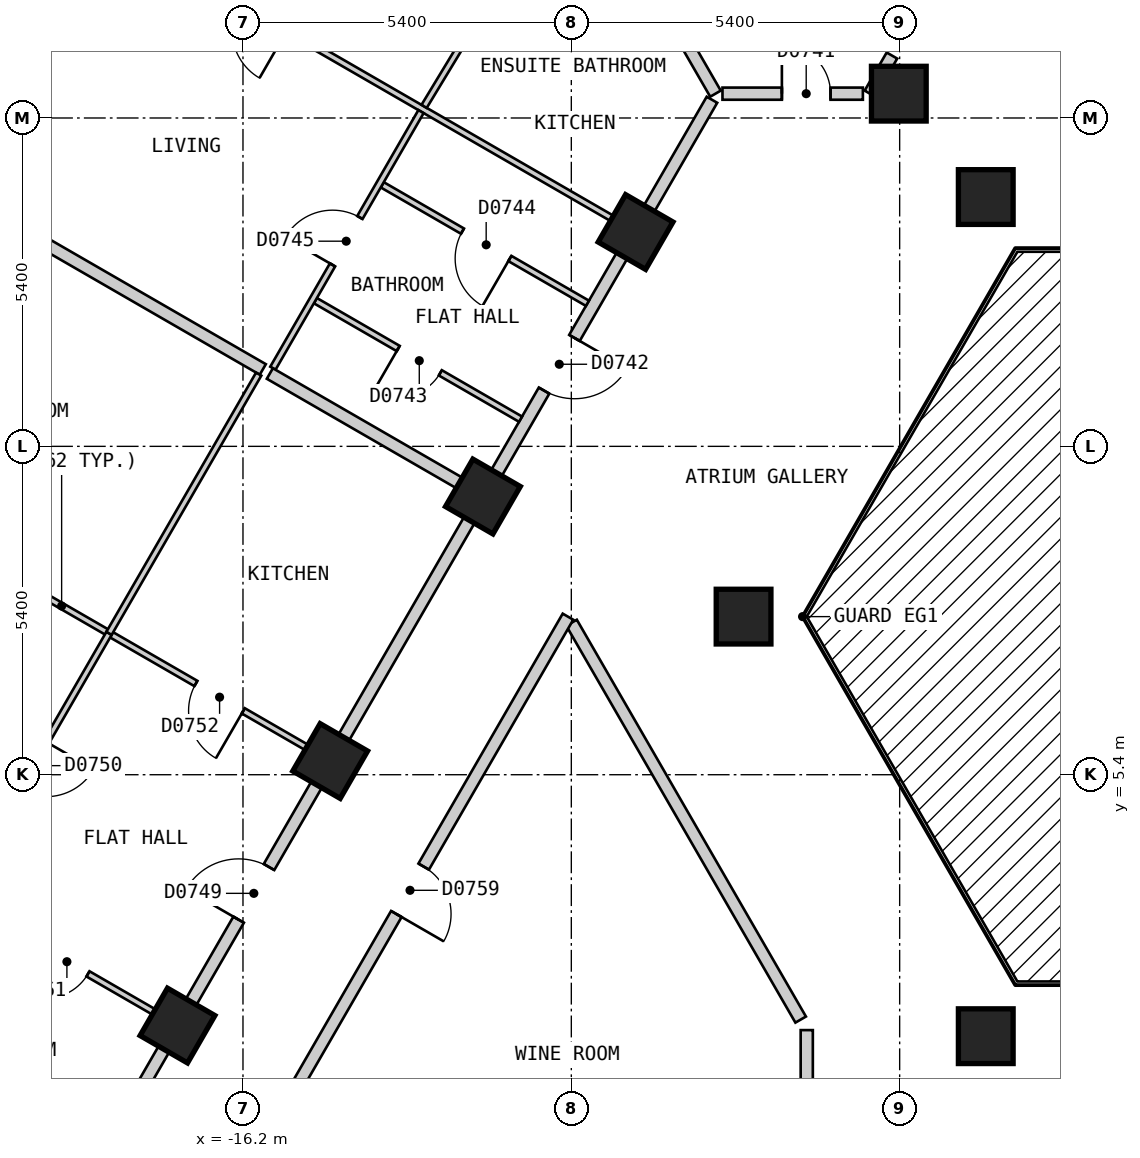
"""IFC4 building model, lengths in metres.
Left out: names, types, materials, properties, quantities, classifications, styles, units other than length and angle.
Written with IfcOpenShell. Run it as: python <this file> out.ifc"""

import sys

from ifc_helpers import new_model, si_unit, direction, frame, frame_2d, origin, origin_2d, place, context, subcontext, project, spatial, polyline, rectangle, outline, extrude, element, fill, save


model = new_model("IFC4")
c1 = context("Model", 3, precision=1e-05, world=origin(), true_north=direction((0.0, 1.0)))
c2 = subcontext(c1, "Body", "Model", "MODEL_VIEW")
j1 = project(units=[si_unit("LENGTHUNIT", "METRE"), si_unit("PLANEANGLEUNIT", "RADIAN")], contexts=[c1])
p1 = place(None, origin())
s1 = spatial("IfcSite", under=j1, at=p1, CompositionType="ELEMENT")
p2 = place(p1, origin())
s2 = spatial("IfcBuilding", under=s1, at=p2, CompositionType="ELEMENT")
p3 = place(p2, frame((0.0, 0.0, 105.0)))
s3 = spatial("IfcBuildingStorey", under=s2, at=p3, CompositionType="ELEMENT", Elevation=105.0)
for number, where, z_axis, x_axis in (
    (1, (-3.984, 14.9, 0.0), (0.0, 0.0, 1.0), (1.0, 0.0, 0.0)),
    (2, (-5.414, 16.6, 0.0), (0.0, 0.0, 1.0), (-1.0, 0.0, 0.0)),
    (3, (-9.743, 14.325, 0.0), (0.0, 0.0, 1.0), (-0.5, -0.866, 0.0)),
    (4, (-7.967, 8.0, 0.0), (0.0, 0.0, 1.0), (1.0, 0.0, 0.0)),
    (5, (-12.254, 9.975, 0.0), (0.0, 0.0, 1.0), (-0.5, -0.866, 0.0)),
    (6, (-14.766, 5.625, 0.0), (0.0, 0.0, 1.0), (-0.5, -0.866, 0.0)),
    (7, (-3.984, 1.1, 0.0), (0.0, 0.0, 1.0), (1.0, 0.0, 0.0)),
    (8, (-17.277, 1.275, 0.0), (0.0, 0.0, 1.0), (-0.5, -0.866, 0.0)),
):
    element("IfcColumn", number, at=place(p3, frame(where, z_axis=z_axis, x_axis=x_axis)), inside=s3, PredefinedType="COLUMN", context=c2, shape_type="SweptSolid", body=[
        extrude(rectangle(XDim=0.9, YDim=0.9, at=origin_2d()), origin(), (0.0, 0.0, 1.0), 3.0),
    ])
p4 = place(p3, frame((-15.747, 24.425, 0.0), z_axis=(0.0, 0.0, 1.0), x_axis=(-0.500027479704, -0.866009537788, 0.0)))
e9 = element("IfcWall", 9, at=p4, inside=s3, PredefinedType="SOLIDWALL", context=c2, shape_type="SweptSolid", body=[
    extrude(outline(polyline([(0.0, -0.15), (26.559, -0.15), (26.478, 0.15), (0.08, 0.15), (0.0, -0.15)])), origin(), (0.0, 0.0, 1.0), 2.6),
])
p5 = place(p4, frame((1.227, 0.0, 0.15)))
e10 = element("IfcOpeningElement", 10, at=p5, cuts=e9, PredefinedType="OPENING", context=c2, shape_type="SweptSolid", body=[
    extrude(rectangle(XDim=1.5, YDim=2.1, at=frame_2d((0.75, 1.05))), frame((0.0, 0.16, 0.0), z_axis=(0.0, -1.0, 0.0), x_axis=(1.0, 0.0, 0.0)), (0.0, 0.0, 1.0), 0.32),
])
p6 = place(p4, frame((3.739, 0.0, 0.15)))
e11 = element("IfcOpeningElement", 11, at=p6, cuts=e9, PredefinedType="OPENING", context=c2, shape_type="SweptSolid", body=[
    extrude(rectangle(XDim=1.5, YDim=2.1, at=frame_2d((0.75, 1.05))), frame((0.0, 0.16, 0.0), z_axis=(0.0, -1.0, 0.0), x_axis=(1.0, 0.0, 0.0)), (0.0, 0.0, 1.0), 0.32),
])
p7 = place(p4, frame((6.25, 0.0, 0.15)))
e12 = element("IfcOpeningElement", 12, at=p7, cuts=e9, PredefinedType="OPENING", context=c2, shape_type="SweptSolid", body=[
    extrude(rectangle(XDim=1.5, YDim=2.1, at=frame_2d((0.75, 1.05))), frame((0.0, 0.16, 0.0), z_axis=(0.0, -1.0, 0.0), x_axis=(1.0, 0.0, 0.0)), (0.0, 0.0, 1.0), 0.32),
])
p8 = place(p4, frame((8.761, 0.0, 0.15)))
e13 = element("IfcOpeningElement", 13, at=p8, cuts=e9, PredefinedType="OPENING", context=c2, shape_type="SweptSolid", body=[
    extrude(rectangle(XDim=1.5, YDim=2.1, at=frame_2d((0.75, 1.05))), frame((0.0, 0.16, 0.0), z_axis=(0.0, -1.0, 0.0), x_axis=(1.0, 0.0, 0.0)), (0.0, 0.0, 1.0), 0.32),
])
p9 = place(p4, frame((11.273, 0.0, 0.15)))
e14 = element("IfcOpeningElement", 14, at=p9, cuts=e9, PredefinedType="OPENING", context=c2, shape_type="SweptSolid", body=[
    extrude(rectangle(XDim=1.5, YDim=2.1, at=frame_2d((0.75, 1.05))), frame((0.0, 0.16, 0.0), z_axis=(0.0, -1.0, 0.0), x_axis=(1.0, 0.0, 0.0)), (0.0, 0.0, 1.0), 0.32),
])
p10 = place(p4, frame((13.785, 0.0, 0.15)))
e15 = element("IfcOpeningElement", 15, at=p10, cuts=e9, PredefinedType="OPENING", context=c2, shape_type="SweptSolid", body=[
    extrude(rectangle(XDim=1.5, YDim=2.1, at=frame_2d((0.75, 1.05))), frame((0.0, 0.16, 0.0), z_axis=(0.0, -1.0, 0.0), x_axis=(1.0, 0.0, 0.0)), (0.0, 0.0, 1.0), 0.32),
])
p11 = place(p4, frame((16.296, 0.0, 0.15)))
e16 = element("IfcOpeningElement", 16, at=p11, cuts=e9, PredefinedType="OPENING", context=c2, shape_type="SweptSolid", body=[
    extrude(rectangle(XDim=1.5, YDim=2.1, at=frame_2d((0.75, 1.05))), frame((0.0, 0.16, 0.0), z_axis=(0.0, -1.0, 0.0), x_axis=(1.0, 0.0, 0.0)), (0.0, 0.0, 1.0), 0.32),
])
p12 = place(p4, frame((18.807, 0.0, 0.15)))
e17 = element("IfcOpeningElement", 17, at=p12, cuts=e9, PredefinedType="OPENING", context=c2, shape_type="SweptSolid", body=[
    extrude(rectangle(XDim=1.5, YDim=2.1, at=frame_2d((0.75, 1.05))), frame((0.0, 0.16, 0.0), z_axis=(0.0, -1.0, 0.0), x_axis=(1.0, 0.0, 0.0)), (0.0, 0.0, 1.0), 0.32),
])
p13 = place(p4, frame((21.319, 0.0, 0.15)))
e18 = element("IfcOpeningElement", 18, at=p13, cuts=e9, PredefinedType="OPENING", context=c2, shape_type="SweptSolid", body=[
    extrude(rectangle(XDim=1.5, YDim=2.1, at=frame_2d((0.75, 1.05))), frame((0.0, 0.16, 0.0), z_axis=(0.0, -1.0, 0.0), x_axis=(1.0, 0.0, 0.0)), (0.0, 0.0, 1.0), 0.32),
])
p14 = place(p4, frame((23.831, 0.0, 0.15)))
e19 = element("IfcOpeningElement", 19, at=p14, cuts=e9, PredefinedType="OPENING", context=c2, shape_type="SweptSolid", body=[
    extrude(rectangle(XDim=1.5, YDim=2.1, at=frame_2d((0.75, 1.05))), frame((0.0, 0.16, 0.0), z_axis=(0.0, -1.0, 0.0), x_axis=(1.0, 0.0, 0.0)), (0.0, 0.0, 1.0), 0.32),
])
p15 = place(p3, frame((-10.796, 7.899, 0.0), z_axis=(0.0, 0.0, 1.0), x_axis=(0.500010383074, -0.866019409031, 0.0)))
e20 = element("IfcWall", 20, at=p15, inside=s3, PredefinedType="PARTITIONING", context=c2, shape_type="SweptSolid", body=[
    extrude(rectangle(XDim=7.535, YDim=0.2, at=frame_2d((3.768, 0.0))), origin(), (0.0, 0.0, 1.0), 2.6),
])
p16 = place(p3, frame((-8.314, 16.6, 0.0), z_axis=(0.0, 0.0, 1.0), x_axis=(1.0, 0.0, 0.0)))
e21 = element("IfcWall", 21, at=p16, inside=s3, PredefinedType="PARTITIONING", context=c2, shape_type="SweptSolid", body=[
    extrude(rectangle(XDim=2.309, YDim=0.2, at=frame_2d((1.155, 0.0))), origin(), (0.0, 0.0, 1.0), 2.6),
])
p17 = place(p16, frame((0.977, 0.0, 0.0)))
e22 = element("IfcOpeningElement", 22, at=p17, cuts=e21, PredefinedType="OPENING", context=c2, shape_type="SweptSolid", body=[
    extrude(rectangle(XDim=0.8, YDim=2.1, at=frame_2d((0.4, 1.05))), frame((0.0, 0.11, 0.0), z_axis=(0.0, -1.0, 0.0), x_axis=(1.0, 0.0, 0.0)), (0.0, 0.0, 1.0), 0.22),
])
p18 = place(p3, frame((-16.05, -1.0, 0.0), z_axis=(0.0, 0.0, 1.0), x_axis=(0.499962449088, 0.866047082728, 0.0)))
e23 = element("IfcWall", 23, at=p18, inside=s3, PredefinedType="PARTITIONING", context=c2, shape_type="SweptSolid", body=[
    extrude(rectangle(XDim=10.391, YDim=0.2, at=frame_2d((5.195, 0.0))), origin(), (0.0, 0.0, 1.0), 2.6),
])
p19 = place(p18, frame((4.745, 0.0, 0.0)))
e24 = element("IfcOpeningElement", 24, at=p19, cuts=e23, PredefinedType="OPENING", context=c2, shape_type="SweptSolid", body=[
    extrude(rectangle(XDim=0.9, YDim=2.1, at=frame_2d((0.45, 1.05))), frame((0.0, 0.11, 0.0), z_axis=(0.0, -1.0, 0.0), x_axis=(1.0, 0.0, 0.0)), (0.0, 0.0, 1.0), 0.22),
])
p20 = place(p3, frame((-5.889, 16.6, 0.0), z_axis=(0.0, 0.0, 1.0), x_axis=(0.499839240638, 0.866118198353, 0.0)))
e25 = element("IfcWall", 25, at=p20, inside=s3, PredefinedType="PARTITIONING", context=c2, shape_type="SweptSolid", body=[
    extrude(rectangle(XDim=0.724, YDim=0.2, at=frame_2d((0.362, 0.0))), origin(), (0.0, 0.0, 1.0), 2.6),
])
p21 = place(p3, frame((-18.533, -0.901, 0.0), z_axis=(0.0, 0.0, 1.0), x_axis=(0.499981198768, 0.866036258409, 0.0)))
e26 = element("IfcWall", 26, at=p21, inside=s3, PredefinedType="PARTITIONING", context=c2, shape_type="SweptSolid", body=[
    extrude(rectangle(XDim=20.093, YDim=0.2, at=frame_2d((10.046, 0.0))), origin(), (0.0, 0.0, 1.0), 2.6),
])
p22 = place(p21, frame((14.57, 0.0, 0.0)))
e27 = element("IfcOpeningElement", 27, at=p22, cuts=e26, PredefinedType="OPENING", context=c2, shape_type="SweptSolid", body=[
    extrude(rectangle(XDim=1.0, YDim=2.1, at=frame_2d((0.5, 1.05))), frame((0.0, 0.11, 0.0), z_axis=(0.0, -1.0, 0.0), x_axis=(1.0, 0.0, 0.0)), (0.0, 0.0, 1.0), 0.22),
])
p23 = place(p21, frame((4.523, 0.0, 0.0)))
e28 = element("IfcOpeningElement", 28, at=p23, cuts=e26, PredefinedType="OPENING", context=c2, shape_type="SweptSolid", body=[
    extrude(rectangle(XDim=1.0, YDim=2.1, at=frame_2d((0.5, 1.05))), frame((0.0, 0.11, 0.0), z_axis=(0.0, -1.0, 0.0), x_axis=(1.0, 0.0, 0.0)), (0.0, 0.0, 1.0), 0.22),
])
p24 = place(p3, frame((-6.928, -2.799, 0.0), z_axis=(0.0, 0.0, 1.0), x_axis=(0.0, 1.0, 0.0)))
e29 = element("IfcWall", 29, at=p24, inside=s3, PredefinedType="PARTITIONING", context=c2, shape_type="SweptSolid", body=[
    extrude(rectangle(XDim=3.999, YDim=0.2, at=frame_2d((2.0, 0.0))), origin(), (0.0, 0.0, 1.0), 2.6),
])
p25 = place(p3, frame((-26.025, 6.325, 0.0), z_axis=(0.0, 0.0, 1.0), x_axis=(0.866041268327, -0.499972520799, 0.0)))
e30 = element("IfcWall", 30, at=p25, inside=s3, PredefinedType="PARTITIONING", context=c2, shape_type="SweptSolid", body=[
    extrude(rectangle(XDim=10.0, YDim=0.1, at=frame_2d((5.0, 0.0))), origin(), (0.0, 0.0, 1.0), 2.6),
])
p26 = place(p25, frame((7.601, 0.0, 0.0)))
e31 = element("IfcOpeningElement", 31, at=p26, cuts=e30, PredefinedType="OPENING", context=c2, shape_type="SweptSolid", body=[
    extrude(rectangle(XDim=0.8, YDim=2.1, at=frame_2d((0.4, 1.05))), frame((0.0, 0.06, 0.0), z_axis=(0.0, -1.0, 0.0), x_axis=(1.0, 0.0, 0.0)), (0.0, 0.0, 1.0), 0.12),
])
p27 = place(p25, frame((2.5, 0.0, 0.0)))
e32 = element("IfcOpeningElement", 32, at=p27, cuts=e30, PredefinedType="OPENING", context=c2, shape_type="SweptSolid", body=[
    extrude(rectangle(XDim=0.9, YDim=2.1, at=frame_2d((0.45, 1.05))), frame((0.0, 0.06, 0.0), z_axis=(0.0, -1.0, 0.0), x_axis=(1.0, 0.0, 0.0)), (0.0, 0.0, 1.0), 0.12),
])
p28 = place(p3, frame((-23.513, 10.675, 0.0), z_axis=(0.0, 0.0, 1.0), x_axis=(0.866041268327, -0.499972520799, 0.0)))
e33 = element("IfcWall", 33, at=p28, inside=s3, PredefinedType="PARTITIONING", context=c2, shape_type="SweptSolid", body=[
    extrude(rectangle(XDim=10.0, YDim=0.1, at=frame_2d((5.0, 0.0))), origin(), (0.0, 0.0, 1.0), 2.6),
])
p29 = place(p28, frame((7.55, 0.0, 0.0)))
e34 = element("IfcOpeningElement", 34, at=p29, cuts=e33, PredefinedType="OPENING", context=c2, shape_type="SweptSolid", body=[
    extrude(rectangle(XDim=0.9, YDim=2.1, at=frame_2d((0.45, 1.05))), frame((0.0, 0.06, 0.0), z_axis=(0.0, -1.0, 0.0), x_axis=(1.0, 0.0, 0.0)), (0.0, 0.0, 1.0), 0.12),
])
p30 = place(p28, frame((2.5, 0.0, 0.0)))
e35 = element("IfcOpeningElement", 35, at=p30, cuts=e33, PredefinedType="OPENING", context=c2, shape_type="SweptSolid", body=[
    extrude(rectangle(XDim=0.9, YDim=2.1, at=frame_2d((0.45, 1.05))), frame((0.0, 0.06, 0.0), z_axis=(0.0, -1.0, 0.0), x_axis=(1.0, 0.0, 0.0)), (0.0, 0.0, 1.0), 0.12),
])
p31 = place(p3, frame((-15.009, 13.196, 0.0), z_axis=(0.0, 0.0, 1.0), x_axis=(0.865916335424, -0.500188864377, 0.0)))
e36 = element("IfcWall", 36, at=p31, inside=s3, PredefinedType="PARTITIONING", context=c2, shape_type="SweptSolid", body=[
    extrude(rectangle(XDim=3.896, YDim=0.1, at=frame_2d((1.948, 0.0))), origin(), (0.0, 0.0, 1.0), 2.6),
])
p32 = place(p31, frame((1.573, 0.0, 0.0)))
e37 = element("IfcOpeningElement", 37, at=p32, cuts=e36, PredefinedType="OPENING", context=c2, shape_type="SweptSolid", body=[
    extrude(rectangle(XDim=0.8, YDim=2.1, at=frame_2d((0.4, 1.05))), frame((0.0, 0.06, 0.0), z_axis=(0.0, -1.0, 0.0), x_axis=(1.0, 0.0, 0.0)), (0.0, 0.0, 1.0), 0.12),
])
p33 = place(p3, frame((-13.909, 15.101, 0.0), z_axis=(0.0, 0.0, 1.0), x_axis=(0.866024880635, -0.500000906121, 0.0)))
e38 = element("IfcWall", 38, at=p33, inside=s3, PredefinedType="PARTITIONING", context=c2, shape_type="SweptSolid", body=[
    extrude(rectangle(XDim=3.896, YDim=0.1, at=frame_2d((1.948, 0.0))), origin(), (0.0, 0.0, 1.0), 2.6),
])
p34 = place(p33, frame((1.523, 0.0, 0.0)))
e39 = element("IfcOpeningElement", 39, at=p34, cuts=e38, PredefinedType="OPENING", context=c2, shape_type="SweptSolid", body=[
    extrude(rectangle(XDim=0.9, YDim=2.1, at=frame_2d((0.45, 1.05))), frame((0.0, 0.06, 0.0), z_axis=(0.0, -1.0, 0.0), x_axis=(1.0, 0.0, 0.0)), (0.0, 0.0, 1.0), 0.12),
])
p35 = place(p3, frame((-18.489, 19.375, 0.0), z_axis=(0.0, 0.0, 1.0), x_axis=(0.866016855193, -0.500014806302, 0.0)))
e40 = element("IfcWall", 40, at=p35, inside=s3, PredefinedType="PARTITIONING", context=c2, shape_type="SweptSolid", body=[
    extrude(rectangle(XDim=10.0, YDim=0.1, at=frame_2d((5.0, 0.0))), origin(), (0.0, 0.0, 1.0), 2.6),
])
p36 = place(p35, frame((2.577, 0.0, 0.0)))
e41 = element("IfcOpeningElement", 41, at=p36, cuts=e40, PredefinedType="OPENING", context=c2, shape_type="SweptSolid", body=[
    extrude(rectangle(XDim=0.9, YDim=2.1, at=frame_2d((0.45, 1.05))), frame((0.0, 0.06, 0.0), z_axis=(0.0, -1.0, 0.0), x_axis=(1.0, 0.0, 0.0)), (0.0, 0.0, 1.0), 0.12),
])
p37 = place(p3, frame((-13.221, 16.391, 0.0), z_axis=(0.0, 0.0, 1.0), x_axis=(0.518164725284, 0.855280841286, 0.0)))
e42 = element("IfcWall", 42, at=p37, inside=s3, PredefinedType="PARTITIONING", context=c2, shape_type="SweptSolid", body=[
    extrude(rectangle(XDim=4.74, YDim=0.1, at=frame_2d((2.37, 0.0))), origin(), (0.0, 0.0, 1.0), 2.6),
])
p38 = place(p37, frame((2.002, 0.0, 0.0)))
e43 = element("IfcOpeningElement", 43, at=p38, cuts=e42, PredefinedType="OPENING", context=c2, shape_type="SweptSolid", body=[
    extrude(rectangle(XDim=0.8, YDim=2.1, at=frame_2d((0.4, 1.05))), frame((0.0, 0.06, 0.0), z_axis=(0.0, -1.0, 0.0), x_axis=(1.0, 0.0, 0.0)), (0.0, 0.0, 1.0), 0.12),
])
p39 = place(p3, frame((-15.708, 12.085, 0.0), z_axis=(0.0, 0.0, 1.0), x_axis=(0.499943653708, 0.866057932887, 0.0)))
e44 = element("IfcWall", 44, at=p39, inside=s3, PredefinedType="PARTITIONING", context=c2, shape_type="SweptSolid", body=[
    extrude(rectangle(XDim=4.873, YDim=0.1, at=frame_2d((2.436, 0.0))), origin(), (0.0, 0.0, 1.0), 2.6),
])
p40 = place(p39, frame((1.962, 0.0, 0.0)))
e45 = element("IfcOpeningElement", 45, at=p40, cuts=e44, PredefinedType="OPENING", context=c2, shape_type="SweptSolid", body=[
    extrude(rectangle(XDim=0.9, YDim=2.1, at=frame_2d((0.45, 1.05))), frame((0.0, 0.06, 0.0), z_axis=(0.0, -1.0, 0.0), x_axis=(1.0, 0.0, 0.0)), (0.0, 0.0, 1.0), 0.12),
])
p41 = place(p3, frame((-20.89, 3.418, 0.0), z_axis=(0.0, 0.0, 1.0), x_axis=(0.500014231302, 0.866017187182, 0.0)))
e46 = element("IfcWall", 46, at=p41, inside=s3, PredefinedType="PARTITIONING", context=c2, shape_type="SweptSolid", body=[
    extrude(rectangle(XDim=4.973, YDim=0.1, at=frame_2d((2.487, 0.0))), origin(), (0.0, 0.0, 1.0), 2.6),
])
p42 = place(p41, frame((2.011, 0.0, 0.0)))
e47 = element("IfcOpeningElement", 47, at=p42, cuts=e46, PredefinedType="OPENING", context=c2, shape_type="SweptSolid", body=[
    extrude(rectangle(XDim=0.9, YDim=2.1, at=frame_2d((0.45, 1.05))), frame((0.0, 0.06, 0.0), z_axis=(0.0, -1.0, 0.0), x_axis=(1.0, 0.0, 0.0)), (0.0, 0.0, 1.0), 0.12),
])
p43 = place(p3, frame((-10.727, 20.58, 0.0), z_axis=(0.0, 0.0, 1.0), x_axis=(0.500041272028, -0.866001574057, 0.0)))
e48 = element("IfcWall", 48, at=p43, inside=s3, PredefinedType="PARTITIONING", context=c2, shape_type="SweptSolid", body=[
    extrude(rectangle(XDim=4.596, YDim=0.2, at=frame_2d((2.298, 0.0))), origin(), (0.0, 0.0, 1.0), 2.6),
])
p44 = place(p3, frame((-21.001, 15.025, 0.0), z_axis=(0.0, 0.0, 1.0), x_axis=(0.866031754707, -0.499988999718, 0.0)))
e49 = element("IfcWall", 49, at=p44, inside=s3, PredefinedType="PARTITIONING", context=c2, shape_type="SweptSolid", body=[
    extrude(rectangle(XDim=5.92, YDim=0.2, at=frame_2d((2.96, 0.0))), origin(), (0.0, 0.0, 1.0), 2.6),
])
p45 = place(p3, frame((-15.758, 11.998, 0.0), z_axis=(0.0, 0.0, 1.0), x_axis=(0.865987741337, -0.5000652276, 0.0)))
e50 = element("IfcWall", 50, at=p45, inside=s3, PredefinedType="PARTITIONING", context=c2, shape_type="SweptSolid", body=[
    extrude(rectangle(XDim=3.946, YDim=0.2, at=frame_2d((1.973, 0.0))), origin(), (0.0, 0.0, 1.0), 2.6),
])
p46 = place(p3, frame((-18.403, 7.725, 0.0), z_axis=(0.0, 0.0, 1.0), x_axis=(0.499995794706, 0.866027831699, 0.0)))
e51 = element("IfcWall", 51, at=p46, inside=s3, PredefinedType="PARTITIONING", context=c2, shape_type="SweptSolid", body=[
    extrude(rectangle(XDim=4.922, YDim=0.1, at=frame_2d((2.461, 0.0))), origin(), (0.0, 0.0, 1.0), 2.6),
])
p47 = place(p17, origin())
e52 = element("IfcDoor", 52, at=p47, inside=s3, OperationType="SINGLE_SWING_LEFT", PredefinedType="DOOR", context=c2, shape_type="SweptSolid", body=[
    extrude(rectangle(XDim=0.8, YDim=2.1, at=frame_2d((0.4, 1.05))), frame((0.0, 0.025, 0.0), z_axis=(0.0, -1.0, 0.0), x_axis=(1.0, 0.0, 0.0)), (0.0, 0.0, 1.0), 0.05),
])
fill(e22, e52)
p48 = place(p22, origin())
e53 = element("IfcDoor", 53, at=p48, inside=s3, OperationType="SINGLE_SWING_RIGHT", PredefinedType="DOOR", context=c2, shape_type="SweptSolid", body=[
    extrude(rectangle(XDim=1.0, YDim=2.1, at=frame_2d((0.5, 1.05))), frame((0.0, 0.025, 0.0), z_axis=(0.0, -1.0, 0.0), x_axis=(1.0, 0.0, 0.0)), (0.0, 0.0, 1.0), 0.05),
])
fill(e27, e53)
p49 = place(p32, origin())
e54 = element("IfcDoor", 54, at=p49, inside=s3, OperationType="SINGLE_SWING_LEFT", PredefinedType="DOOR", context=c2, shape_type="SweptSolid", body=[
    extrude(rectangle(XDim=0.8, YDim=2.1, at=frame_2d((0.4, 1.05))), frame((0.0, 0.025, 0.0), z_axis=(0.0, -1.0, 0.0), x_axis=(1.0, 0.0, 0.0)), (0.0, 0.0, 1.0), 0.05),
])
fill(e37, e54)
p50 = place(p34, origin())
e55 = element("IfcDoor", 55, at=p50, inside=s3, OperationType="SINGLE_SWING_RIGHT", PredefinedType="DOOR", context=c2, shape_type="SweptSolid", body=[
    extrude(rectangle(XDim=0.9, YDim=2.1, at=frame_2d((0.45, 1.05))), frame((0.0, 0.025, 0.0), z_axis=(0.0, -1.0, 0.0), x_axis=(1.0, 0.0, 0.0)), (0.0, 0.0, 1.0), 0.05),
])
fill(e39, e55)
p51 = place(p40, origin())
e56 = element("IfcDoor", 56, at=p51, inside=s3, OperationType="SINGLE_SWING_LEFT", PredefinedType="DOOR", context=c2, shape_type="SweptSolid", body=[
    extrude(rectangle(XDim=0.9, YDim=2.1, at=frame_2d((0.45, 1.05))), frame((0.0, 0.025, 0.0), z_axis=(0.0, -1.0, 0.0), x_axis=(1.0, 0.0, 0.0)), (0.0, 0.0, 1.0), 0.05),
])
fill(e45, e56)
p52 = place(p23, origin())
e57 = element("IfcDoor", 57, at=p52, inside=s3, OperationType="SINGLE_SWING_LEFT", PredefinedType="DOOR", context=c2, shape_type="SweptSolid", body=[
    extrude(rectangle(XDim=1.0, YDim=2.1, at=frame_2d((0.5, 1.05))), frame((0.0, 0.025, 0.0), z_axis=(0.0, -1.0, 0.0), x_axis=(1.0, 0.0, 0.0)), (0.0, 0.0, 1.0), 0.05),
])
fill(e28, e57)
p53 = place(p26, origin())
e58 = element("IfcDoor", 58, at=p53, inside=s3, OperationType="SINGLE_SWING_LEFT", PredefinedType="DOOR", context=c2, shape_type="SweptSolid", body=[
    extrude(rectangle(XDim=0.8, YDim=2.1, at=frame_2d((0.4, 1.05))), frame((0.0, 0.025, 0.0), z_axis=(0.0, -1.0, 0.0), x_axis=(1.0, 0.0, 0.0)), (0.0, 0.0, 1.0), 0.05),
])
fill(e31, e58)
p54 = place(p29, origin())
e59 = element("IfcDoor", 59, at=p54, inside=s3, OperationType="SINGLE_SWING_RIGHT", PredefinedType="DOOR", context=c2, shape_type="SweptSolid", body=[
    extrude(rectangle(XDim=0.9, YDim=2.1, at=frame_2d((0.45, 1.05))), frame((0.0, 0.025, 0.0), z_axis=(0.0, -1.0, 0.0), x_axis=(1.0, 0.0, 0.0)), (0.0, 0.0, 1.0), 0.05),
])
fill(e34, e59)
p55 = place(p19, origin())
e60 = element("IfcDoor", 60, at=p55, inside=s3, OperationType="SINGLE_SWING_LEFT", PredefinedType="DOOR", context=c2, shape_type="SweptSolid", body=[
    extrude(rectangle(XDim=0.9, YDim=2.1, at=frame_2d((0.45, 1.05))), frame((0.0, 0.025, 0.0), z_axis=(0.0, -1.0, 0.0), x_axis=(1.0, 0.0, 0.0)), (0.0, 0.0, 1.0), 0.05),
])
fill(e24, e60)
save(model, sys.argv[1])
